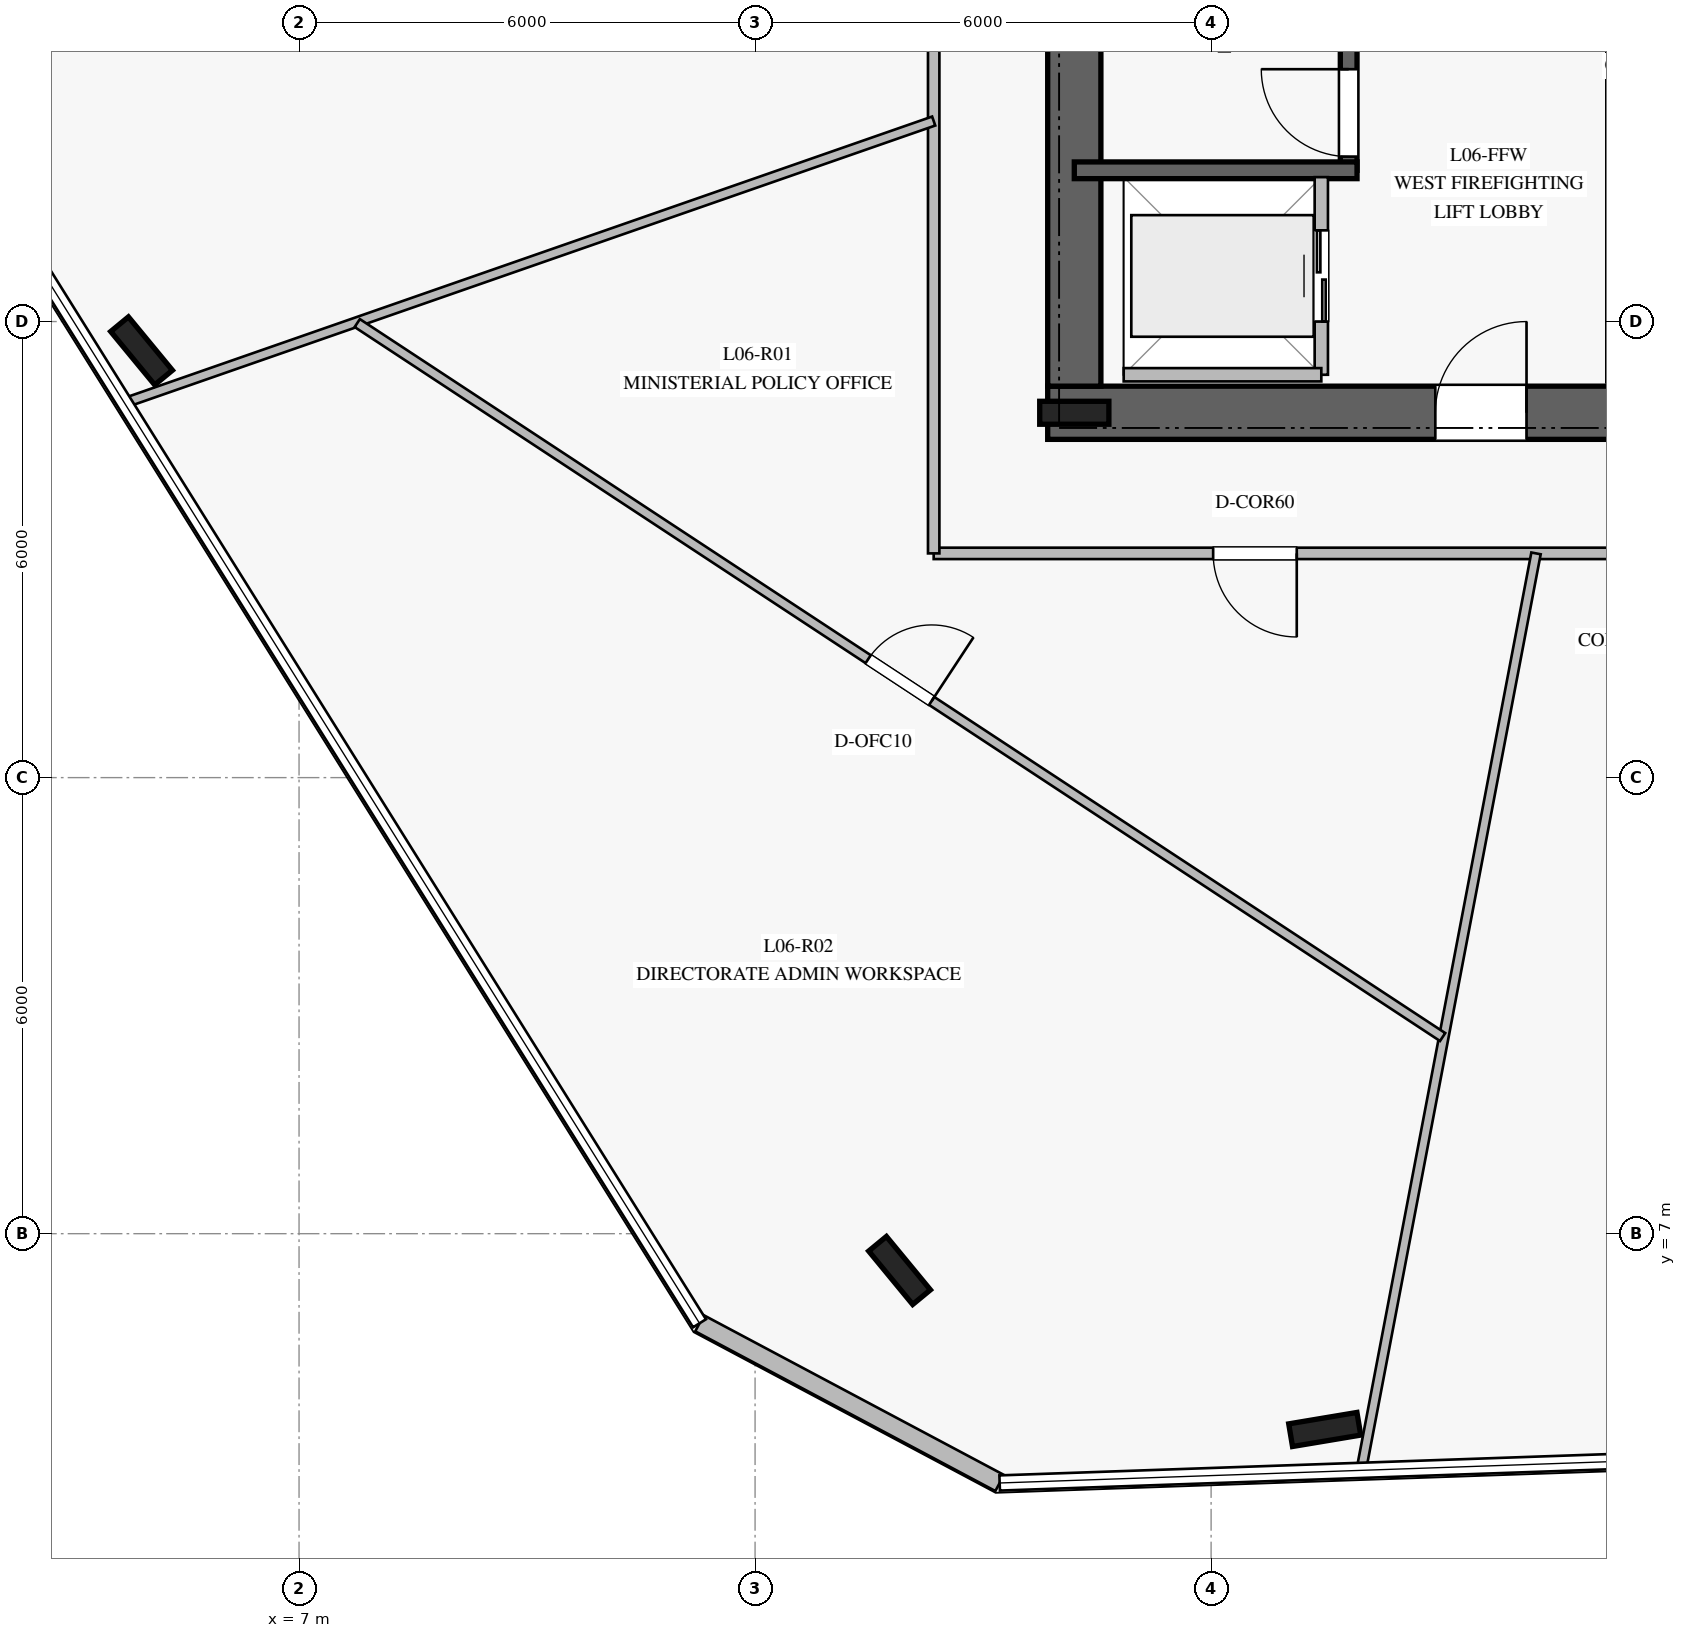
"""IFC4 building model, lengths in metres.
Left out: names, types, materials, properties, quantities, classifications, styles, units other than length and angle.
Written with IfcOpenShell. Run it as: python <this file> out.ifc"""

import sys

from ifc_helpers import new_model, si_unit, direction, frame, frame_2d, origin, origin_2d, place, context, subcontext, project, spatial, rectangle, i_section, extrude, element, fill, save


model = new_model("IFC4")
c1 = context("Model", 3, precision=1e-05, world=origin(), true_north=direction((0.0, 1.0)))
c2 = subcontext(c1, "Body", "Model", "MODEL_VIEW")
j1 = project(units=[si_unit("LENGTHUNIT", "METRE"), si_unit("PLANEANGLEUNIT", "RADIAN")], contexts=[c1])
p1 = place(None, origin())
s1 = spatial("IfcSite", under=j1, at=p1, CompositionType="ELEMENT")
p2 = place(p1, origin())
s2 = spatial("IfcBuilding", under=s1, at=p2, CompositionType="ELEMENT")
p3 = place(p2, frame((0.0, 0.0, 28.0)))
s3 = spatial("IfcBuildingStorey", under=s2, at=p3, CompositionType="ELEMENT", Elevation=28.0)
p4 = place(p3, frame((16.85, 17.8, 0.0), z_axis=(0.0, 0.0, 1.0), x_axis=(1.0, 0.0, 0.0)))
e1 = element("IfcWall", 1, at=p4, inside=s3, PredefinedType="SHEAR", context=c2, shape_type="SweptSolid", body=[
    extrude(rectangle(XDim=16.3, YDim=0.7, at=frame_2d((8.15, 0.0))), origin(), (0.0, 0.0, 1.0), 3.76),
])
p5 = place(p4, frame((5.1, 0.0, 0.0)))
e2 = element("IfcOpeningElement", 2, at=p5, cuts=e1, PredefinedType="OPENING", context=c2, shape_type="SweptSolid", body=[
    extrude(rectangle(XDim=1.2, YDim=2.25, at=frame_2d((0.6, 1.125))), frame((0.0, 0.36, 0.0), z_axis=(0.0, -1.0, 0.0), x_axis=(1.0, 0.0, 0.0)), (0.0, 0.0, 1.0), 0.72),
])
p6 = place(p4, frame((14.05, 0.0, 0.0)))
e3 = element("IfcOpeningElement", 3, at=p6, cuts=e1, PredefinedType="OPENING", context=c2, shape_type="SweptSolid", body=[
    extrude(rectangle(XDim=0.9, YDim=2.1, at=frame_2d((0.45, 1.05))), frame((0.0, 0.36, 0.0), z_axis=(0.0, -1.0, 0.0), x_axis=(1.0, 0.0, 0.0)), (0.0, 0.0, 1.0), 0.72),
])
p7 = place(p4, frame((7.95, 0.0, 0.0)))
e4 = element("IfcOpeningElement", 4, at=p7, cuts=e1, PredefinedType="OPENING", context=c2, shape_type="SweptSolid", body=[
    extrude(rectangle(XDim=1.1, YDim=2.2, at=frame_2d((0.55, 1.1))), frame((0.0, 0.36, 0.0), z_axis=(0.0, -1.0, 0.0), x_axis=(1.0, 0.0, 0.0)), (0.0, 0.0, 1.0), 0.72),
])
p8 = place(p4, frame((9.925, 0.0, 0.0)))
e5 = element("IfcOpeningElement", 5, at=p8, cuts=e1, PredefinedType="OPENING", context=c2, shape_type="SweptSolid", body=[
    extrude(rectangle(XDim=1.1, YDim=2.2, at=frame_2d((0.55, 1.1))), frame((0.0, 0.36, 0.0), z_axis=(0.0, -1.0, 0.0), x_axis=(1.0, 0.0, 0.0)), (0.0, 0.0, 1.0), 0.72),
])
p9 = place(p4, frame((11.9, 0.0, 0.0)))
e6 = element("IfcOpeningElement", 6, at=p9, cuts=e1, PredefinedType="OPENING", context=c2, shape_type="SweptSolid", body=[
    extrude(rectangle(XDim=1.1, YDim=2.2, at=frame_2d((0.55, 1.1))), frame((0.0, 0.36, 0.0), z_axis=(0.0, -1.0, 0.0), x_axis=(1.0, 0.0, 0.0)), (0.0, 0.0, 1.0), 0.72),
])
p10 = place(p3, frame((17.2, 31.85, 0.0), z_axis=(0.0, 0.0, 1.0), x_axis=(0.0, -1.0, 0.0)))
e7 = element("IfcWall", 7, at=p10, inside=s3, PredefinedType="SHEAR", context=c2, shape_type="SweptSolid", body=[
    extrude(rectangle(XDim=13.7, YDim=0.7, at=frame_2d((6.85, 0.0))), origin(), (0.0, 0.0, 1.0), 3.76),
])
p11 = place(p10, frame((2.0, 0.0, 0.0)))
e8 = element("IfcOpeningElement", 8, at=p11, cuts=e7, PredefinedType="OPENING", context=c2, shape_type="SweptSolid", body=[
    extrude(rectangle(XDim=1.5, YDim=2.2, at=frame_2d((0.75, 1.1))), frame((0.0, 0.36, 0.0), z_axis=(0.0, -1.0, 0.0), x_axis=(1.0, 0.0, 0.0)), (0.0, 0.0, 1.0), 0.72),
])
p12 = place(p3, frame((17.2, 17.8, 0.0), z_axis=(0.0, 0.0, 1.0), x_axis=(1.0, 0.0, 0.0)))
e9 = element("IfcColumn", 9, at=p12, inside=s3, PredefinedType="COLUMN", context=c2, shape_type="SweptSolid", body=[
    extrude(i_section(OverallWidth=0.302, OverallDepth=0.91, WebThickness=0.021, FlangeThickness=0.04, at=origin_2d()), origin(), (0.0, 0.0, 1.0), 4.0),
])
p13 = place(p3, frame((20.81, 20.99, 0.0), z_axis=(0.0, 0.0, 1.0), x_axis=(0.0, 1.0, 0.0)))
e10 = element("IfcWall", 10, at=p13, inside=s3, PredefinedType="SOLIDWALL", context=c2, shape_type="SweptSolid", body=[
    extrude(rectangle(XDim=7.22, YDim=0.22, at=frame_2d((3.61, 0.0))), origin(), (0.0, 0.0, 1.0), 3.76),
])
p14 = place(p13, frame((0.18, 0.0, 0.0)))
e11 = element("IfcOpeningElement", 11, at=p14, cuts=e10, PredefinedType="OPENING", context=c2, shape_type="SweptSolid", body=[
    extrude(rectangle(XDim=1.15, YDim=2.2, at=frame_2d((0.575, 1.1))), frame((0.0, 0.12, 0.0), z_axis=(0.0, -1.0, 0.0), x_axis=(1.0, 0.0, 0.0)), (0.0, 0.0, 1.0), 0.24),
])
p15 = place(p3, frame((17.2, 20.99, 0.0), z_axis=(0.0, 0.0, 1.0), x_axis=(1.0, 0.0, 0.0)))
e12 = element("IfcWall", 12, at=p15, inside=s3, PredefinedType="SOLIDWALL", context=c2, shape_type="SweptSolid", body=[
    extrude(rectangle(XDim=3.72, YDim=0.22, at=frame_2d((1.86, 0.0))), origin(), (0.0, 0.0, 1.0), 3.76),
])
for number, where, z_axis, x_axis in (
    (13, (4.928, 18.614, 0.0), (0.0, 0.0, 1.0), (-0.636, 0.772, 0.0)),
    (14, (14.901, 6.516, 0.0), (0.0, 0.0, 1.0), (-0.636, 0.772, 0.0)),
    (15, (20.495, 4.424, 0.0), (0.0, 0.0, 1.0), (0.986, 0.165, 0.0)),
):
    element("IfcColumn", number, at=place(p3, frame(where, z_axis=z_axis, x_axis=x_axis)), inside=s3, PredefinedType="COLUMN", context=c2, shape_type="SweptSolid", body=[
        extrude(i_section(OverallWidth=0.302, OverallDepth=0.91, WebThickness=0.021, FlangeThickness=0.04, at=origin_2d()), origin(), (0.0, 0.0, 1.0), 4.0),
    ])
p16 = place(p3, frame((12.269, 5.821, 0.0), z_axis=(0.0, 0.0, 1.0), x_axis=(0.882820866688, -0.469709822486, 0.0)))
e16 = element("IfcWall", 16, at=p16, inside=s3, PredefinedType="STANDARD", context=c2, shape_type="SweptSolid", body=[
    extrude(rectangle(XDim=4.473, YDim=0.24, at=frame_2d((2.237, 0.0))), origin(), (0.0, 0.0, 1.0), 3.76),
])
p17 = place(p3, frame((20.45, 18.3, 0.0), z_axis=(0.0, 0.0, 1.0), x_axis=(0.0, 1.0, 0.0)))
e17 = element("IfcWall", 17, at=p17, inside=s3, PredefinedType="PARTITIONING", context=c2, shape_type="SweptSolid", body=[
    extrude(rectangle(XDim=2.6, YDim=0.175, at=frame_2d((1.3, 0.0))), origin(), (0.0, 0.0, 1.0), 3.76),
])
p18 = place(p17, frame((0.7, 0.0, 0.0)))
e18 = element("IfcOpeningElement", 18, at=p18, cuts=e17, PredefinedType="OPENING", context=c2, shape_type="SweptSolid", body=[
    extrude(rectangle(XDim=1.2, YDim=2.2, at=frame_2d((0.6, 1.1))), frame((0.0, 0.098, 0.0), z_axis=(0.0, -1.0, 0.0), x_axis=(1.0, 0.0, 0.0)), (0.0, 0.0, 1.0), 0.195),
])
p19 = place(p3, frame((17.85, 18.3, 0.0), z_axis=(0.0, 0.0, 1.0), x_axis=(1.0, 0.0, 0.0)))
e19 = element("IfcWall", 19, at=p19, inside=s3, PredefinedType="PARTITIONING", context=c2, shape_type="SweptSolid", body=[
    extrude(rectangle(XDim=2.6, YDim=0.175, at=frame_2d((1.3, 0.0))), origin(), (0.0, 0.0, 1.0), 3.76),
])
p20 = place(p3, frame((34.65, 15.95, 0.0), z_axis=(0.0, 0.0, 1.0), x_axis=(-1.0, 0.0, 0.0)))
e20 = element("IfcWall", 20, at=p20, inside=s3, PredefinedType="PARTITIONING", context=c2, shape_type="SweptSolid", body=[
    extrude(rectangle(XDim=19.3, YDim=0.15, at=frame_2d((9.65, 0.0))), origin(), (0.0, 0.0, 1.0), 3.21),
])
p21 = place(p20, frame((14.523, 0.0, 0.0)))
e21 = element("IfcOpeningElement", 21, at=p21, cuts=e20, PredefinedType="OPENING", context=c2, shape_type="SweptSolid", body=[
    extrude(rectangle(XDim=1.1, YDim=2.2, at=frame_2d((0.55, 1.1))), frame((0.0, 0.085, 0.0), z_axis=(0.0, -1.0, 0.0), x_axis=(1.0, 0.0, 0.0)), (0.0, 0.0, 1.0), 0.17),
])
p22 = place(p20, frame((5.327, 0.0, 0.0)))
e22 = element("IfcOpeningElement", 22, at=p22, cuts=e20, PredefinedType="OPENING", context=c2, shape_type="SweptSolid", body=[
    extrude(rectangle(XDim=1.1, YDim=2.2, at=frame_2d((0.55, 1.1))), frame((0.0, 0.085, 0.0), z_axis=(0.0, -1.0, 0.0), x_axis=(1.0, 0.0, 0.0)), (0.0, 0.0, 1.0), 0.17),
])
p23 = place(p3, frame((15.35, 15.95, 0.0), z_axis=(0.0, 0.0, 1.0), x_axis=(0.0, 1.0, 0.0)))
e23 = element("IfcWall", 23, at=p23, inside=s3, PredefinedType="PARTITIONING", context=c2, shape_type="SweptSolid", body=[
    extrude(rectangle(XDim=18.1, YDim=0.15, at=frame_2d((9.05, 0.0))), origin(), (0.0, 0.0, 1.0), 3.21),
])
p24 = place(p23, frame((11.011, 0.0, 0.0)))
e24 = element("IfcOpeningElement", 24, at=p24, cuts=e23, PredefinedType="OPENING", context=c2, shape_type="SweptSolid", body=[
    extrude(rectangle(XDim=1.1, YDim=2.2, at=frame_2d((0.55, 1.1))), frame((0.0, 0.085, 0.0), z_axis=(0.0, -1.0, 0.0), x_axis=(1.0, 0.0, 0.0)), (0.0, 0.0, 1.0), 0.17),
])
p25 = place(p3, frame((15.35, 21.638, 0.0), z_axis=(0.0, 0.0, 1.0), x_axis=(-0.944346596396, -0.328952133105, 0.0)))
e25 = element("IfcWall", 25, at=p25, inside=s3, PredefinedType="PARTITIONING", context=c2, shape_type="SweptSolid", body=[
    extrude(rectangle(XDim=11.257, YDim=0.125, at=frame_2d((5.628, 0.0))), origin(), (0.0, 0.0, 1.0), 3.06),
])
p26 = place(p3, frame((23.275, 15.95, 0.0), z_axis=(0.0, 0.0, 1.0), x_axis=(-0.187302392837, -0.982302302572, 0.0)))
e26 = element("IfcWall", 26, at=p26, inside=s3, PredefinedType="PARTITIONING", context=c2, shape_type="SweptSolid", body=[
    extrude(rectangle(XDim=12.263, YDim=0.125, at=frame_2d((6.131, 0.0))), origin(), (0.0, 0.0, 1.0), 3.06),
])
p27 = place(p3, frame((7.766, 18.98, 0.0), z_axis=(0.0, 0.0, 1.0), x_axis=(0.83545815699, -0.549554062781, 0.0)))
e27 = element("IfcWall", 27, at=p27, inside=s3, PredefinedType="PARTITIONING", context=c2, shape_type="SweptSolid", body=[
    extrude(rectangle(XDim=17.092, YDim=0.125, at=frame_2d((8.546, 0.0))), origin(), (0.0, 0.0, 1.0), 3.05),
])
p28 = place(p27, frame((8.046, 0.0, 0.0)))
e28 = element("IfcOpeningElement", 28, at=p28, cuts=e27, PredefinedType="OPENING", context=c2, shape_type="SweptSolid", body=[
    extrude(rectangle(XDim=1.0, YDim=2.15, at=frame_2d((0.5, 1.075))), frame((0.0, 0.073, 0.0), z_axis=(0.0, -1.0, 0.0), x_axis=(1.0, 0.0, 0.0)), (0.0, 0.0, 1.0), 0.145),
])
p29 = place(p14, origin())
e29 = element("IfcDoor", 29, at=p29, inside=s3, OperationType="SINGLE_SWING_RIGHT", PredefinedType="DOOR", context=c2, shape_type="SweptSolid", body=[
    extrude(rectangle(XDim=1.15, YDim=2.2, at=frame_2d((0.575, 1.1))), frame((0.0, 0.025, 0.0), z_axis=(0.0, -1.0, 0.0), x_axis=(1.0, 0.0, 0.0)), (0.0, 0.0, 1.0), 0.05),
])
fill(e11, e29)
p30 = place(p5, origin())
e30 = element("IfcDoor", 30, at=p30, inside=s3, OperationType="SINGLE_SWING_RIGHT", PredefinedType="DOOR", context=c2, shape_type="SweptSolid", body=[
    extrude(rectangle(XDim=1.2, YDim=2.25, at=frame_2d((0.6, 1.125))), frame((0.0, 0.025, 0.0), z_axis=(0.0, -1.0, 0.0), x_axis=(1.0, 0.0, 0.0)), (0.0, 0.0, 1.0), 0.05),
])
fill(e2, e30)
p31 = place(p18, origin())
e31 = element("IfcDoor", 31, at=p31, inside=s3, OperationType="DOUBLE_DOOR_SLIDING", PredefinedType="DOOR", context=c2, shape_type="SweptSolid", body=[
    extrude(rectangle(XDim=1.2, YDim=2.2, at=frame_2d((0.6, 1.1))), frame((0.0, 0.025, 0.0), z_axis=(0.0, -1.0, 0.0), x_axis=(1.0, 0.0, 0.0)), (0.0, 0.0, 1.0), 0.05),
])
fill(e18, e31)
p32 = place(p21, origin())
e32 = element("IfcDoor", 32, at=p32, inside=s3, OperationType="SINGLE_SWING_LEFT", PredefinedType="DOOR", context=c2, shape_type="SweptSolid", body=[
    extrude(rectangle(XDim=1.1, YDim=2.2, at=frame_2d((0.55, 1.1))), frame((0.0, 0.025, 0.0), z_axis=(0.0, -1.0, 0.0), x_axis=(1.0, 0.0, 0.0)), (0.0, 0.0, 1.0), 0.05),
])
fill(e21, e32)
p33 = place(p28, origin())
e33 = element("IfcDoor", 33, at=p33, inside=s3, OperationType="SINGLE_SWING_RIGHT", PredefinedType="DOOR", context=c2, shape_type="SweptSolid", body=[
    extrude(rectangle(XDim=1.0, YDim=2.15, at=frame_2d((0.5, 1.075))), frame((0.0, 0.025, 0.0), z_axis=(0.0, -1.0, 0.0), x_axis=(1.0, 0.0, 0.0)), (0.0, 0.0, 1.0), 0.05),
])
fill(e28, e33)
save(model, sys.argv[1])
